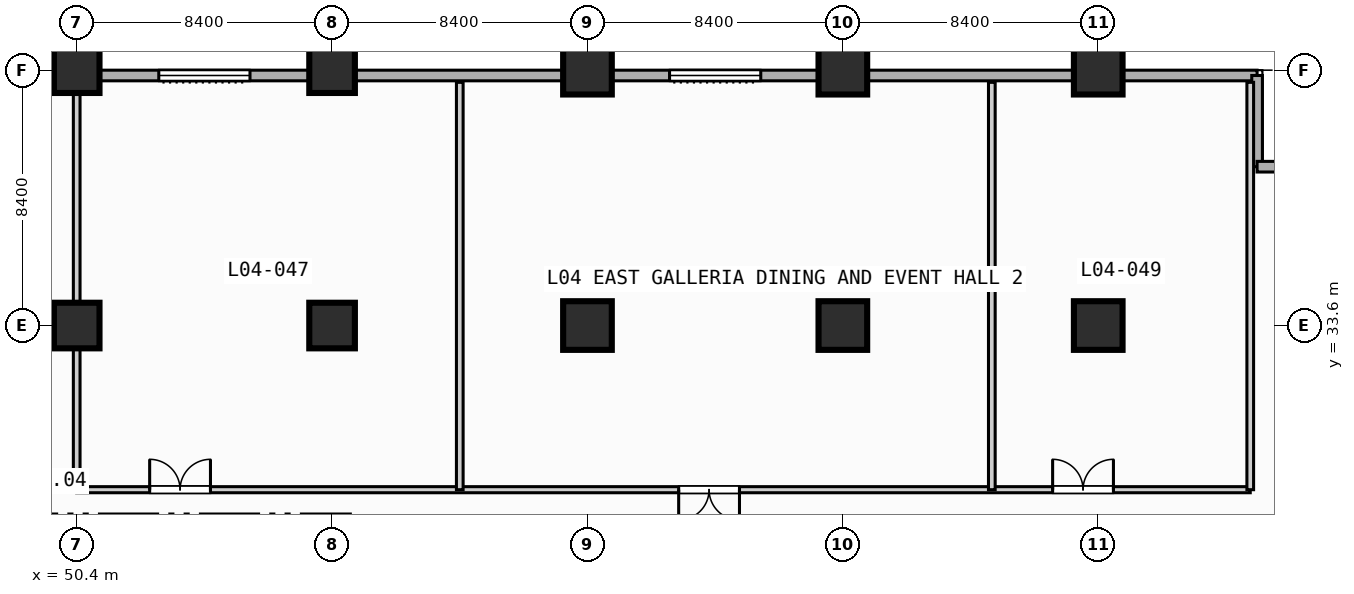
"""IFC4 building model, lengths in metres.
Left out: names, types, materials, properties, quantities, classifications, styles, units other than length and angle.
Written with IfcOpenShell. Run it as: python <this file> out.ifc"""

import sys

from ifc_helpers import new_model, si_unit, direction, frame, frame_2d, origin, origin_2d, place, context, subcontext, project, spatial, rectangle, extrude, element, fill, save


model = new_model("IFC4")
c1 = context("Model", 3, precision=1e-05, world=origin(), true_north=direction((0.0, 1.0)))
c2 = subcontext(c1, "Body", "Model", "MODEL_VIEW")
j1 = project(units=[si_unit("LENGTHUNIT", "METRE"), si_unit("PLANEANGLEUNIT", "RADIAN")], contexts=[c1])
p1 = place(None, origin())
s1 = spatial("IfcSite", under=j1, at=p1, CompositionType="ELEMENT")
p2 = place(p1, origin())
s2 = spatial("IfcBuilding", under=s1, at=p2, CompositionType="ELEMENT")
p3 = place(p2, frame((0.0, 0.0, 20.8)))
s3 = spatial("IfcBuildingStorey", under=s2, at=p3, CompositionType="ELEMENT", Elevation=20.8)
for number, where, z_axis, x_axis in (
    (1, (50.4, 33.6, 0.0), (0.0, 0.0, 1.0), (1.0, 0.0, 0.0)),
    (2, (50.4, 42.0, 0.0), (0.0, 0.0, 1.0), (1.0, 0.0, 0.0)),
    (3, (58.8, 33.6, 0.0), (0.0, 0.0, 1.0), (1.0, 0.0, 0.0)),
    (4, (58.8, 42.0, 0.0), (0.0, 0.0, 1.0), (1.0, 0.0, 0.0)),
):
    element("IfcColumn", number, at=place(p3, frame(where, z_axis=z_axis, x_axis=x_axis)), inside=s3, PredefinedType="COLUMN", context=c2, shape_type="SweptSolid", body=[
        extrude(rectangle(XDim=1.5, YDim=1.5, at=origin_2d()), origin(), (0.0, 0.0, 1.0), 5.2),
    ])
for number, where, z_axis, x_axis in (
    (5, (67.2, 33.6, 0.0), (0.0, 0.0, 1.0), (1.0, 0.0, 0.0)),
    (6, (67.2, 42.0, 0.0), (0.0, 0.0, 1.0), (1.0, 0.0, 0.0)),
    (7, (75.6, 33.6, 0.0), (0.0, 0.0, 1.0), (1.0, 0.0, 0.0)),
    (8, (75.6, 42.0, 0.0), (0.0, 0.0, 1.0), (1.0, 0.0, 0.0)),
    (9, (84.0, 33.6, 0.0), (0.0, 0.0, 1.0), (1.0, 0.0, 0.0)),
    (10, (84.0, 42.0, 0.0), (0.0, 0.0, 1.0), (1.0, 0.0, 0.0)),
):
    element("IfcColumn", number, at=place(p3, frame(where, z_axis=z_axis, x_axis=x_axis)), inside=s3, PredefinedType="COLUMN", context=c2, shape_type="SweptSolid", body=[
        extrude(rectangle(XDim=1.6, YDim=1.6, at=origin_2d()), origin(), (0.0, 0.0, 1.0), 5.2),
    ])
p4 = place(p3, frame((41.825, 41.825, 0.0), z_axis=(0.0, 0.0, 1.0), x_axis=(1.0, 0.0, 0.0)))
e11 = element("IfcWall", 11, at=p4, inside=s3, PredefinedType="STANDARD", context=c2, shape_type="SweptSolid", body=[
    extrude(rectangle(XDim=47.4, YDim=0.35, at=frame_2d((23.7, 0.0))), origin(), (0.0, 0.0, 1.0), 4.75),
])
p5 = place(p4, frame((11.275, 0.0, 0.85)))
e12 = element("IfcOpeningElement", 12, at=p5, cuts=e11, PredefinedType="OPENING", context=c2, shape_type="SweptSolid", body=[
    extrude(rectangle(XDim=3.0, YDim=2.4, at=frame_2d((1.5, 1.2))), frame((0.0, 0.185, 0.0), z_axis=(0.0, -1.0, 0.0), x_axis=(1.0, 0.0, 0.0)), (0.0, 0.0, 1.0), 0.37),
])
p6 = place(p4, frame((28.075, 0.0, 0.85)))
e13 = element("IfcOpeningElement", 13, at=p6, cuts=e11, PredefinedType="OPENING", context=c2, shape_type="SweptSolid", body=[
    extrude(rectangle(XDim=3.0, YDim=2.4, at=frame_2d((1.5, 1.2))), frame((0.0, 0.185, 0.0), z_axis=(0.0, -1.0, 0.0), x_axis=(1.0, 0.0, 0.0)), (0.0, 0.0, 1.0), 0.37),
])
for number, where, z_axis, x_axis in (
    (14, (89.225, 41.825, 0.0), (0.0, 0.0, 1.0), (0.0, -1.0, 0.0)),
    (15, (89.225, 38.825, 0.0), (0.0, 0.0, 1.0), (1.0, 0.0, 0.0)),
):
    element("IfcWall", number, at=place(p3, frame(where, z_axis=z_axis, x_axis=x_axis)), inside=s3, PredefinedType="STANDARD", context=c2, shape_type="SweptSolid", body=[
        extrude(rectangle(XDim=3.0, YDim=0.35, at=frame_2d((1.5, 0.0))), origin(), (0.0, 0.0, 1.0), 4.75),
    ])
p7 = place(p3, frame((50.4, 28.2, 0.0), z_axis=(0.0, 0.0, 1.0), x_axis=(1.0, 0.0, 0.0)))
e16 = element("IfcWall", 16, at=p7, inside=s3, PredefinedType="PARTITIONING", context=c2, shape_type="SweptSolid", body=[
    extrude(rectangle(XDim=38.6, YDim=0.2, at=frame_2d((19.3, 0.0))), origin(), (0.0, 0.0, 1.0), 4.75),
])
p8 = place(p7, frame((2.4, 0.0, 0.0)))
e17 = element("IfcOpeningElement", 17, at=p8, cuts=e16, PredefinedType="OPENING", context=c2, shape_type="SweptSolid", body=[
    extrude(rectangle(XDim=2.0, YDim=2.15, at=frame_2d((1.0, 1.075))), frame((0.0, 0.11, 0.0), z_axis=(0.0, -1.0, 0.0), x_axis=(1.0, 0.0, 0.0)), (0.0, 0.0, 1.0), 0.22),
])
p9 = place(p7, frame((19.8, 0.0, 0.0)))
e18 = element("IfcOpeningElement", 18, at=p9, cuts=e16, PredefinedType="OPENING", context=c2, shape_type="SweptSolid", body=[
    extrude(rectangle(XDim=2.0, YDim=2.15, at=frame_2d((1.0, 1.075))), frame((0.0, 0.11, 0.0), z_axis=(0.0, -1.0, 0.0), x_axis=(1.0, 0.0, 0.0)), (0.0, 0.0, 1.0), 0.22),
])
p10 = place(p7, frame((32.1, 0.0, 0.0)))
e19 = element("IfcOpeningElement", 19, at=p10, cuts=e16, PredefinedType="OPENING", context=c2, shape_type="SweptSolid", body=[
    extrude(rectangle(XDim=2.0, YDim=2.15, at=frame_2d((1.0, 1.075))), frame((0.0, 0.11, 0.0), z_axis=(0.0, -1.0, 0.0), x_axis=(1.0, 0.0, 0.0)), (0.0, 0.0, 1.0), 0.22),
])
p11 = place(p3, frame((50.4, 28.2, 0.0), z_axis=(0.0, 0.0, 1.0), x_axis=(0.0, 1.0, 0.0)))
e20 = element("IfcWall", 20, at=p11, inside=s3, PredefinedType="PARTITIONING", context=c2, shape_type="SweptSolid", body=[
    extrude(rectangle(XDim=13.4, YDim=0.22, at=frame_2d((6.7, 0.0))), origin(), (0.0, 0.0, 1.0), 3.9),
])
for number, where, z_axis, x_axis in (
    (21, (63.0, 28.2, 0.0), (0.0, 0.0, 1.0), (0.0, 1.0, 0.0)),
    (22, (80.5, 28.2, 0.0), (0.0, 0.0, 1.0), (0.0, 1.0, 0.0)),
    (23, (89.0, 28.2, 0.0), (0.0, 0.0, 1.0), (0.0, 1.0, 0.0)),
):
    element("IfcWall", number, at=place(p3, frame(where, z_axis=z_axis, x_axis=x_axis)), inside=s3, PredefinedType="PARTITIONING", context=c2, shape_type="SweptSolid", body=[
        extrude(rectangle(XDim=13.4, YDim=0.22, at=frame_2d((6.7, 0.0))), origin(), (0.0, 0.0, 1.0), 4.75),
    ])
p12 = place(p5, origin())
e24 = element("IfcWindow", 24, at=p12, inside=s3, PartitioningType="SINGLE_PANEL", PredefinedType="WINDOW", context=c2, shape_type="SweptSolid", body=[
    extrude(rectangle(XDim=3.0, YDim=2.4, at=frame_2d((1.5, 1.2))), frame((0.0, 0.03, 0.0), z_axis=(0.0, -1.0, 0.0), x_axis=(1.0, 0.0, 0.0)), (0.0, 0.0, 1.0), 0.06),
])
fill(e12, e24)
p13 = place(p6, origin())
e25 = element("IfcWindow", 25, at=p13, inside=s3, PartitioningType="SINGLE_PANEL", PredefinedType="WINDOW", context=c2, shape_type="SweptSolid", body=[
    extrude(rectangle(XDim=3.0, YDim=2.4, at=frame_2d((1.5, 1.2))), frame((0.0, 0.03, 0.0), z_axis=(0.0, -1.0, 0.0), x_axis=(1.0, 0.0, 0.0)), (0.0, 0.0, 1.0), 0.06),
])
fill(e13, e25)
p14 = place(p8, origin())
e26 = element("IfcDoor", 26, at=p14, inside=s3, OperationType="SINGLE_SWING_LEFT", PredefinedType="DOOR", context=c2, shape_type="SweptSolid", body=[
    extrude(rectangle(XDim=2.0, YDim=2.15, at=frame_2d((1.0, 1.075))), frame((0.0, 0.025, 0.0), z_axis=(0.0, -1.0, 0.0), x_axis=(1.0, 0.0, 0.0)), (0.0, 0.0, 1.0), 0.05),
])
fill(e17, e26)
p15 = place(p9, origin())
e27 = element("IfcDoor", 27, at=p15, inside=s3, OperationType="SINGLE_SWING_RIGHT", PredefinedType="DOOR", context=c2, shape_type="SweptSolid", body=[
    extrude(rectangle(XDim=2.0, YDim=2.15, at=frame_2d((1.0, 1.075))), frame((0.0, 0.025, 0.0), z_axis=(0.0, -1.0, 0.0), x_axis=(1.0, 0.0, 0.0)), (0.0, 0.0, 1.0), 0.05),
])
fill(e18, e27)
p16 = place(p10, origin())
e28 = element("IfcDoor", 28, at=p16, inside=s3, OperationType="SINGLE_SWING_LEFT", PredefinedType="DOOR", context=c2, shape_type="SweptSolid", body=[
    extrude(rectangle(XDim=2.0, YDim=2.15, at=frame_2d((1.0, 1.075))), frame((0.0, 0.025, 0.0), z_axis=(0.0, -1.0, 0.0), x_axis=(1.0, 0.0, 0.0)), (0.0, 0.0, 1.0), 0.05),
])
fill(e19, e28)
save(model, sys.argv[1])
